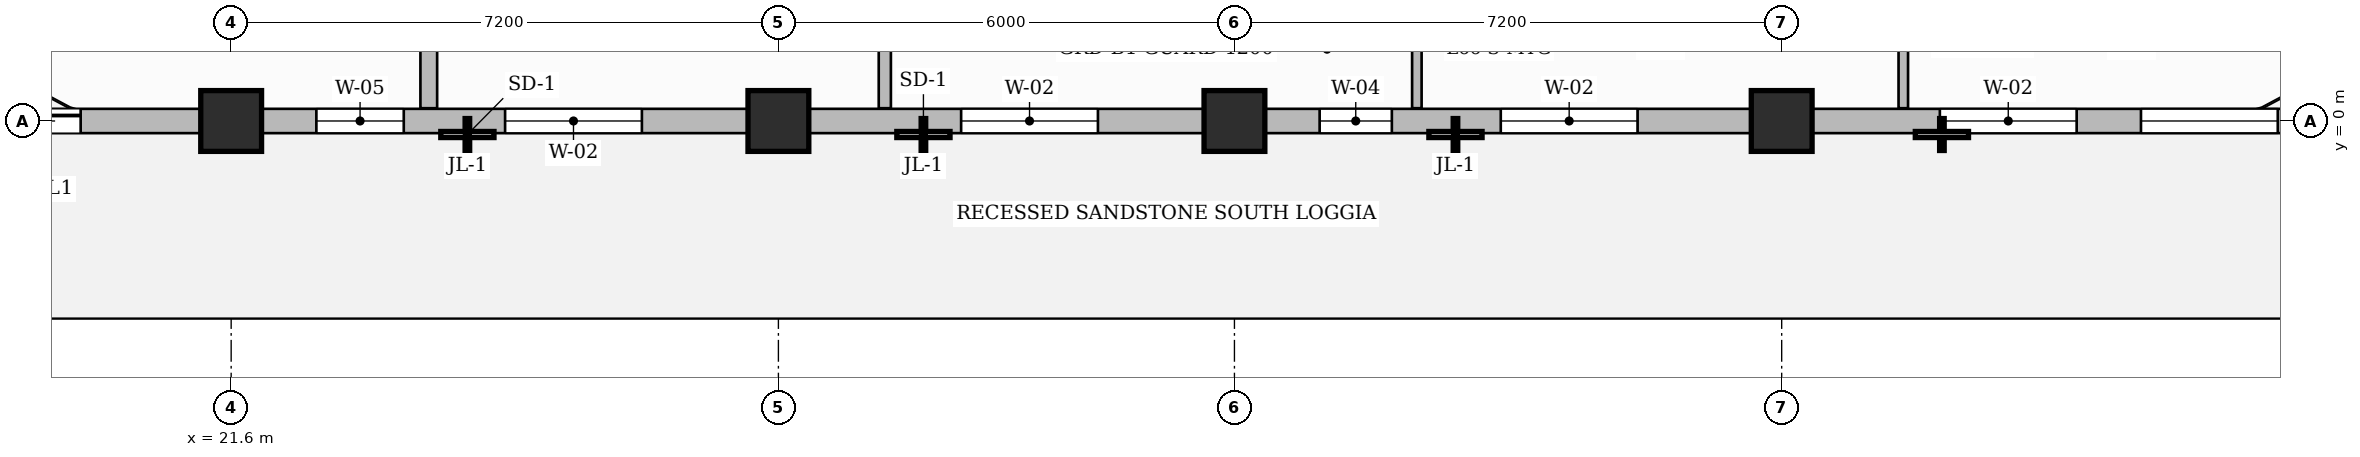
"""IFC4 building model, lengths in metres.
Left out: names, types, materials, properties, quantities, classifications, styles, units other than length and angle.
Written with IfcOpenShell. Run it as: python <this file> out.ifc"""

import sys

from ifc_helpers import new_model, si_unit, direction, frame, frame_2d, origin, origin_2d, place, context, subcontext, project, spatial, rectangle, extrude, source, transform, mapped, element, fill, save


model = new_model("IFC4")
c1 = context("Model", 3, precision=1e-05, world=origin(), true_north=direction((0.0, 1.0)))
c2 = subcontext(c1, "Body", "Model", "MODEL_VIEW")
j1 = project(units=[si_unit("LENGTHUNIT", "METRE"), si_unit("PLANEANGLEUNIT", "RADIAN")], contexts=[c1])
p1 = place(None, origin())
s1 = spatial("IfcSite", under=j1, at=p1, CompositionType="ELEMENT")
p2 = place(p1, origin())
s2 = spatial("IfcBuilding", under=s1, at=p2, CompositionType="ELEMENT")
p3 = place(p2, frame((0.0, 0.0, 263.5)))
s3 = spatial("IfcBuildingStorey", under=s2, at=p3, CompositionType="ELEMENT", Elevation=263.5)
m1 = source(origin(), c2, "Body", "SweptSolid", [
    extrude(rectangle(XDim=0.8, YDim=0.8, at=origin_2d()), origin(), (0.0, 0.0, 1.0), 3.85),
])
for number, where, z_axis, x_axis in (
    (1, (21.6, 0.0, 0.0), (0.0, 0.0, 1.0), (1.0, 0.0, 0.0)),
    (2, (28.8, 0.0, 0.0), (0.0, 0.0, 1.0), (1.0, 0.0, 0.0)),
    (3, (34.8, 0.0, 0.0), (0.0, 0.0, 1.0), (1.0, 0.0, 0.0)),
    (4, (42.0, 0.0, 0.0), (0.0, 0.0, 1.0), (1.0, 0.0, 0.0)),
):
    element("IfcColumn", number, at=place(p3, frame(where, z_axis=z_axis, x_axis=x_axis)), inside=s3, PredefinedType="COLUMN", context=c2, shape_type="MappedRepresentation", body=[
        mapped(m1, transform((0.0, 0.0, 0.0), scale=1.0)),
    ])
p4 = place(p3, frame((30.2, 0.168, 0.0), z_axis=(0.0, 0.0, 1.0), x_axis=(0.0, 1.0, 0.0)))
e5 = element("IfcWall", 5, at=p4, inside=s3, PredefinedType="PARTITIONING", context=c2, shape_type="SweptSolid", body=[
    extrude(rectangle(XDim=9.092, YDim=0.16, at=frame_2d((4.546, 0.0))), origin(), (0.0, 0.0, 1.0), 3.6),
])
p5 = place(p4, frame((1.957, 0.0, 0.0)))
e6 = element("IfcOpeningElement", 6, at=p5, cuts=e5, PredefinedType="OPENING", context=c2, shape_type="SweptSolid", body=[
    extrude(rectangle(XDim=1.05, YDim=2.15, at=frame_2d((0.525, 1.075))), frame((0.0, 0.09, 0.0), z_axis=(0.0, -1.0, 0.0), x_axis=(1.0, 0.0, 0.0)), (0.0, 0.0, 1.0), 0.18),
])
for number, where, z_axis, x_axis in (
    (7, (37.2, 0.168, 0.0), (0.0, 0.0, 1.0), (0.0, 1.0, 0.0)),
    (8, (43.6, 0.168, 0.0), (0.0, 0.0, 1.0), (0.0, 1.0, 0.0)),
):
    element("IfcWall", number, at=place(p3, frame(where, z_axis=z_axis, x_axis=x_axis)), inside=s3, PredefinedType="PARTITIONING", context=c2, shape_type="SweptSolid", body=[
        extrude(rectangle(XDim=1.542, YDim=0.125, at=frame_2d((0.771, 0.0))), origin(), (0.0, 0.0, 1.0), 3.6),
    ])
p6 = place(p3, frame((24.2, 0.168, 0.0), z_axis=(0.0, 0.0, 1.0), x_axis=(0.0, 1.0, 0.0)))
e9 = element("IfcWall", 9, at=p6, inside=s3, PredefinedType="PARTITIONING", context=c2, shape_type="SweptSolid", body=[
    extrude(rectangle(XDim=9.092, YDim=0.22, at=frame_2d((4.546, 0.0))), origin(), (0.0, 0.0, 1.0), 3.6),
])
p7 = place(p3, frame((18.0, 0.0, 0.0), z_axis=(0.0, 0.0, 1.0), x_axis=(1.0, 0.0, 0.0)))
e10 = element("IfcWall", 10, at=p7, inside=s3, PredefinedType="SOLIDWALL", context=c2, shape_type="SweptSolid", body=[
    extrude(rectangle(XDim=31.8, YDim=0.32, at=frame_2d((15.9, 0.0))), origin(), (0.0, 0.0, 1.0), 3.185),
])
p8 = place(p7, frame((0.42, 0.0, 0.0)))
e11 = element("IfcOpeningElement", 11, at=p8, cuts=e10, PredefinedType="OPENING", context=c2, shape_type="SweptSolid", body=[
    extrude(rectangle(XDim=1.2, YDim=2.2, at=frame_2d((0.6, 1.1))), frame((0.0, 0.17, 0.0), z_axis=(0.0, -1.0, 0.0), x_axis=(1.0, 0.0, 0.0)), (0.0, 0.0, 1.0), 0.34),
])
p9 = place(p7, frame((4.721, 0.0, 0.8)))
e12 = element("IfcOpeningElement", 12, at=p9, cuts=e10, PredefinedType="OPENING", context=c2, shape_type="SweptSolid", body=[
    extrude(rectangle(XDim=1.15, YDim=1.8, at=frame_2d((0.575, 0.9))), frame((0.0, 0.17, 0.0), z_axis=(0.0, -1.0, 0.0), x_axis=(1.0, 0.0, 0.0)), (0.0, 0.0, 1.0), 0.34),
])
p10 = place(p7, frame((7.204, 0.0, 0.8)))
e13 = element("IfcOpeningElement", 13, at=p10, cuts=e10, PredefinedType="OPENING", context=c2, shape_type="SweptSolid", body=[
    extrude(rectangle(XDim=1.8, YDim=1.85, at=frame_2d((0.9, 0.925))), frame((0.0, 0.17, 0.0), z_axis=(0.0, -1.0, 0.0), x_axis=(1.0, 0.0, 0.0)), (0.0, 0.0, 1.0), 0.34),
])
p11 = place(p7, frame((13.204, 0.0, 0.8)))
e14 = element("IfcOpeningElement", 14, at=p11, cuts=e10, PredefinedType="OPENING", context=c2, shape_type="SweptSolid", body=[
    extrude(rectangle(XDim=1.8, YDim=1.85, at=frame_2d((0.9, 0.925))), frame((0.0, 0.17, 0.0), z_axis=(0.0, -1.0, 0.0), x_axis=(1.0, 0.0, 0.0)), (0.0, 0.0, 1.0), 0.34),
])
p12 = place(p7, frame((17.921, 0.0, 0.8)))
e15 = element("IfcOpeningElement", 15, at=p12, cuts=e10, PredefinedType="OPENING", context=c2, shape_type="SweptSolid", body=[
    extrude(rectangle(XDim=0.95, YDim=1.75, at=frame_2d((0.475, 0.875))), frame((0.0, 0.17, 0.0), z_axis=(0.0, -1.0, 0.0), x_axis=(1.0, 0.0, 0.0)), (0.0, 0.0, 1.0), 0.34),
])
p13 = place(p7, frame((20.304, 0.0, 0.8)))
e16 = element("IfcOpeningElement", 16, at=p13, cuts=e10, PredefinedType="OPENING", context=c2, shape_type="SweptSolid", body=[
    extrude(rectangle(XDim=1.8, YDim=1.85, at=frame_2d((0.9, 0.925))), frame((0.0, 0.17, 0.0), z_axis=(0.0, -1.0, 0.0), x_axis=(1.0, 0.0, 0.0)), (0.0, 0.0, 1.0), 0.34),
])
p14 = place(p7, frame((26.081, 0.0, 0.8)))
e17 = element("IfcOpeningElement", 17, at=p14, cuts=e10, PredefinedType="OPENING", context=c2, shape_type="SweptSolid", body=[
    extrude(rectangle(XDim=1.8, YDim=1.85, at=frame_2d((0.9, 0.925))), frame((0.0, 0.17, 0.0), z_axis=(0.0, -1.0, 0.0), x_axis=(1.0, 0.0, 0.0)), (0.0, 0.0, 1.0), 0.34),
])
p15 = place(p7, frame((28.727, 0.0, 0.8)))
e18 = element("IfcOpeningElement", 18, at=p15, cuts=e10, PredefinedType="OPENING", context=c2, shape_type="SweptSolid", body=[
    extrude(rectangle(XDim=1.8, YDim=1.85, at=frame_2d((0.9, 0.925))), frame((0.0, 0.17, 0.0), z_axis=(0.0, -1.0, 0.0), x_axis=(1.0, 0.0, 0.0)), (0.0, 0.0, 1.0), 0.34),
])
m2 = source(origin(), c2, "Body", "SweptSolid", [
    extrude(rectangle(XDim=1.2, YDim=2.2, at=frame_2d((0.6, 1.1))), frame((0.0, 0.025, 0.0), z_axis=(0.0, -1.0, 0.0), x_axis=(1.0, 0.0, 0.0)), (0.0, 0.0, 1.0), 0.05),
])
p16 = place(p8, origin())
e19 = element("IfcDoor", 19, at=p16, inside=s3, OperationType="SLIDING_TO_LEFT", PredefinedType="DOOR", context=c2, shape_type="MappedRepresentation", body=[
    mapped(m2, transform((0.0, 0.0, 0.0), scale=1.0)),
])
fill(e11, e19)
m3 = source(origin(), c2, "Body", "SweptSolid", [
    extrude(rectangle(XDim=1.15, YDim=1.8, at=frame_2d((0.575, 0.9))), frame((0.0, 0.03, 0.0), z_axis=(0.0, -1.0, 0.0), x_axis=(1.0, 0.0, 0.0)), (0.0, 0.0, 1.0), 0.06),
])
p17 = place(p9, origin())
e20 = element("IfcWindow", 20, at=p17, inside=s3, PartitioningType="SINGLE_PANEL", PredefinedType="WINDOW", context=c2, shape_type="MappedRepresentation", body=[
    mapped(m3, transform((0.0, 0.0, 0.0), scale=1.0)),
])
fill(e12, e20)
m4 = source(origin(), c2, "Body", "SweptSolid", [
    extrude(rectangle(XDim=1.8, YDim=1.85, at=frame_2d((0.9, 0.925))), frame((0.0, 0.03, 0.0), z_axis=(0.0, -1.0, 0.0), x_axis=(1.0, 0.0, 0.0)), (0.0, 0.0, 1.0), 0.06),
])
p18 = place(p10, origin())
e21 = element("IfcWindow", 21, at=p18, inside=s3, PartitioningType="DOUBLE_PANEL_VERTICAL", PredefinedType="WINDOW", context=c2, shape_type="MappedRepresentation", body=[
    mapped(m4, transform((0.0, 0.0, 0.0), scale=1.0)),
])
fill(e13, e21)
p19 = place(p11, origin())
e22 = element("IfcWindow", 22, at=p19, inside=s3, PartitioningType="DOUBLE_PANEL_VERTICAL", PredefinedType="WINDOW", context=c2, shape_type="MappedRepresentation", body=[
    mapped(m4, transform((0.0, 0.0, 0.0), scale=1.0)),
])
fill(e14, e22)
m5 = source(origin(), c2, "Body", "SweptSolid", [
    extrude(rectangle(XDim=0.95, YDim=1.75, at=frame_2d((0.475, 0.875))), frame((0.0, 0.03, 0.0), z_axis=(0.0, -1.0, 0.0), x_axis=(1.0, 0.0, 0.0)), (0.0, 0.0, 1.0), 0.06),
])
p20 = place(p12, origin())
e23 = element("IfcWindow", 23, at=p20, inside=s3, PartitioningType="SINGLE_PANEL", PredefinedType="WINDOW", context=c2, shape_type="MappedRepresentation", body=[
    mapped(m5, transform((0.0, 0.0, 0.0), scale=1.0)),
])
fill(e15, e23)
p21 = place(p13, origin())
e24 = element("IfcWindow", 24, at=p21, inside=s3, PartitioningType="DOUBLE_PANEL_VERTICAL", PredefinedType="WINDOW", context=c2, shape_type="MappedRepresentation", body=[
    mapped(m4, transform((0.0, 0.0, 0.0), scale=1.0)),
])
fill(e16, e24)
p22 = place(p14, origin())
e25 = element("IfcWindow", 25, at=p22, inside=s3, PartitioningType="DOUBLE_PANEL_VERTICAL", PredefinedType="WINDOW", context=c2, shape_type="MappedRepresentation", body=[
    mapped(m4, transform((0.0, 0.0, 0.0), scale=1.0)),
])
fill(e17, e25)
p23 = place(p15, origin())
e26 = element("IfcWindow", 26, at=p23, inside=s3, PartitioningType="DOUBLE_PANEL_VERTICAL", PredefinedType="WINDOW", context=c2, shape_type="MappedRepresentation", body=[
    mapped(m4, transform((0.0, 0.0, 0.0), scale=1.0)),
])
fill(e18, e26)
save(model, sys.argv[1])
